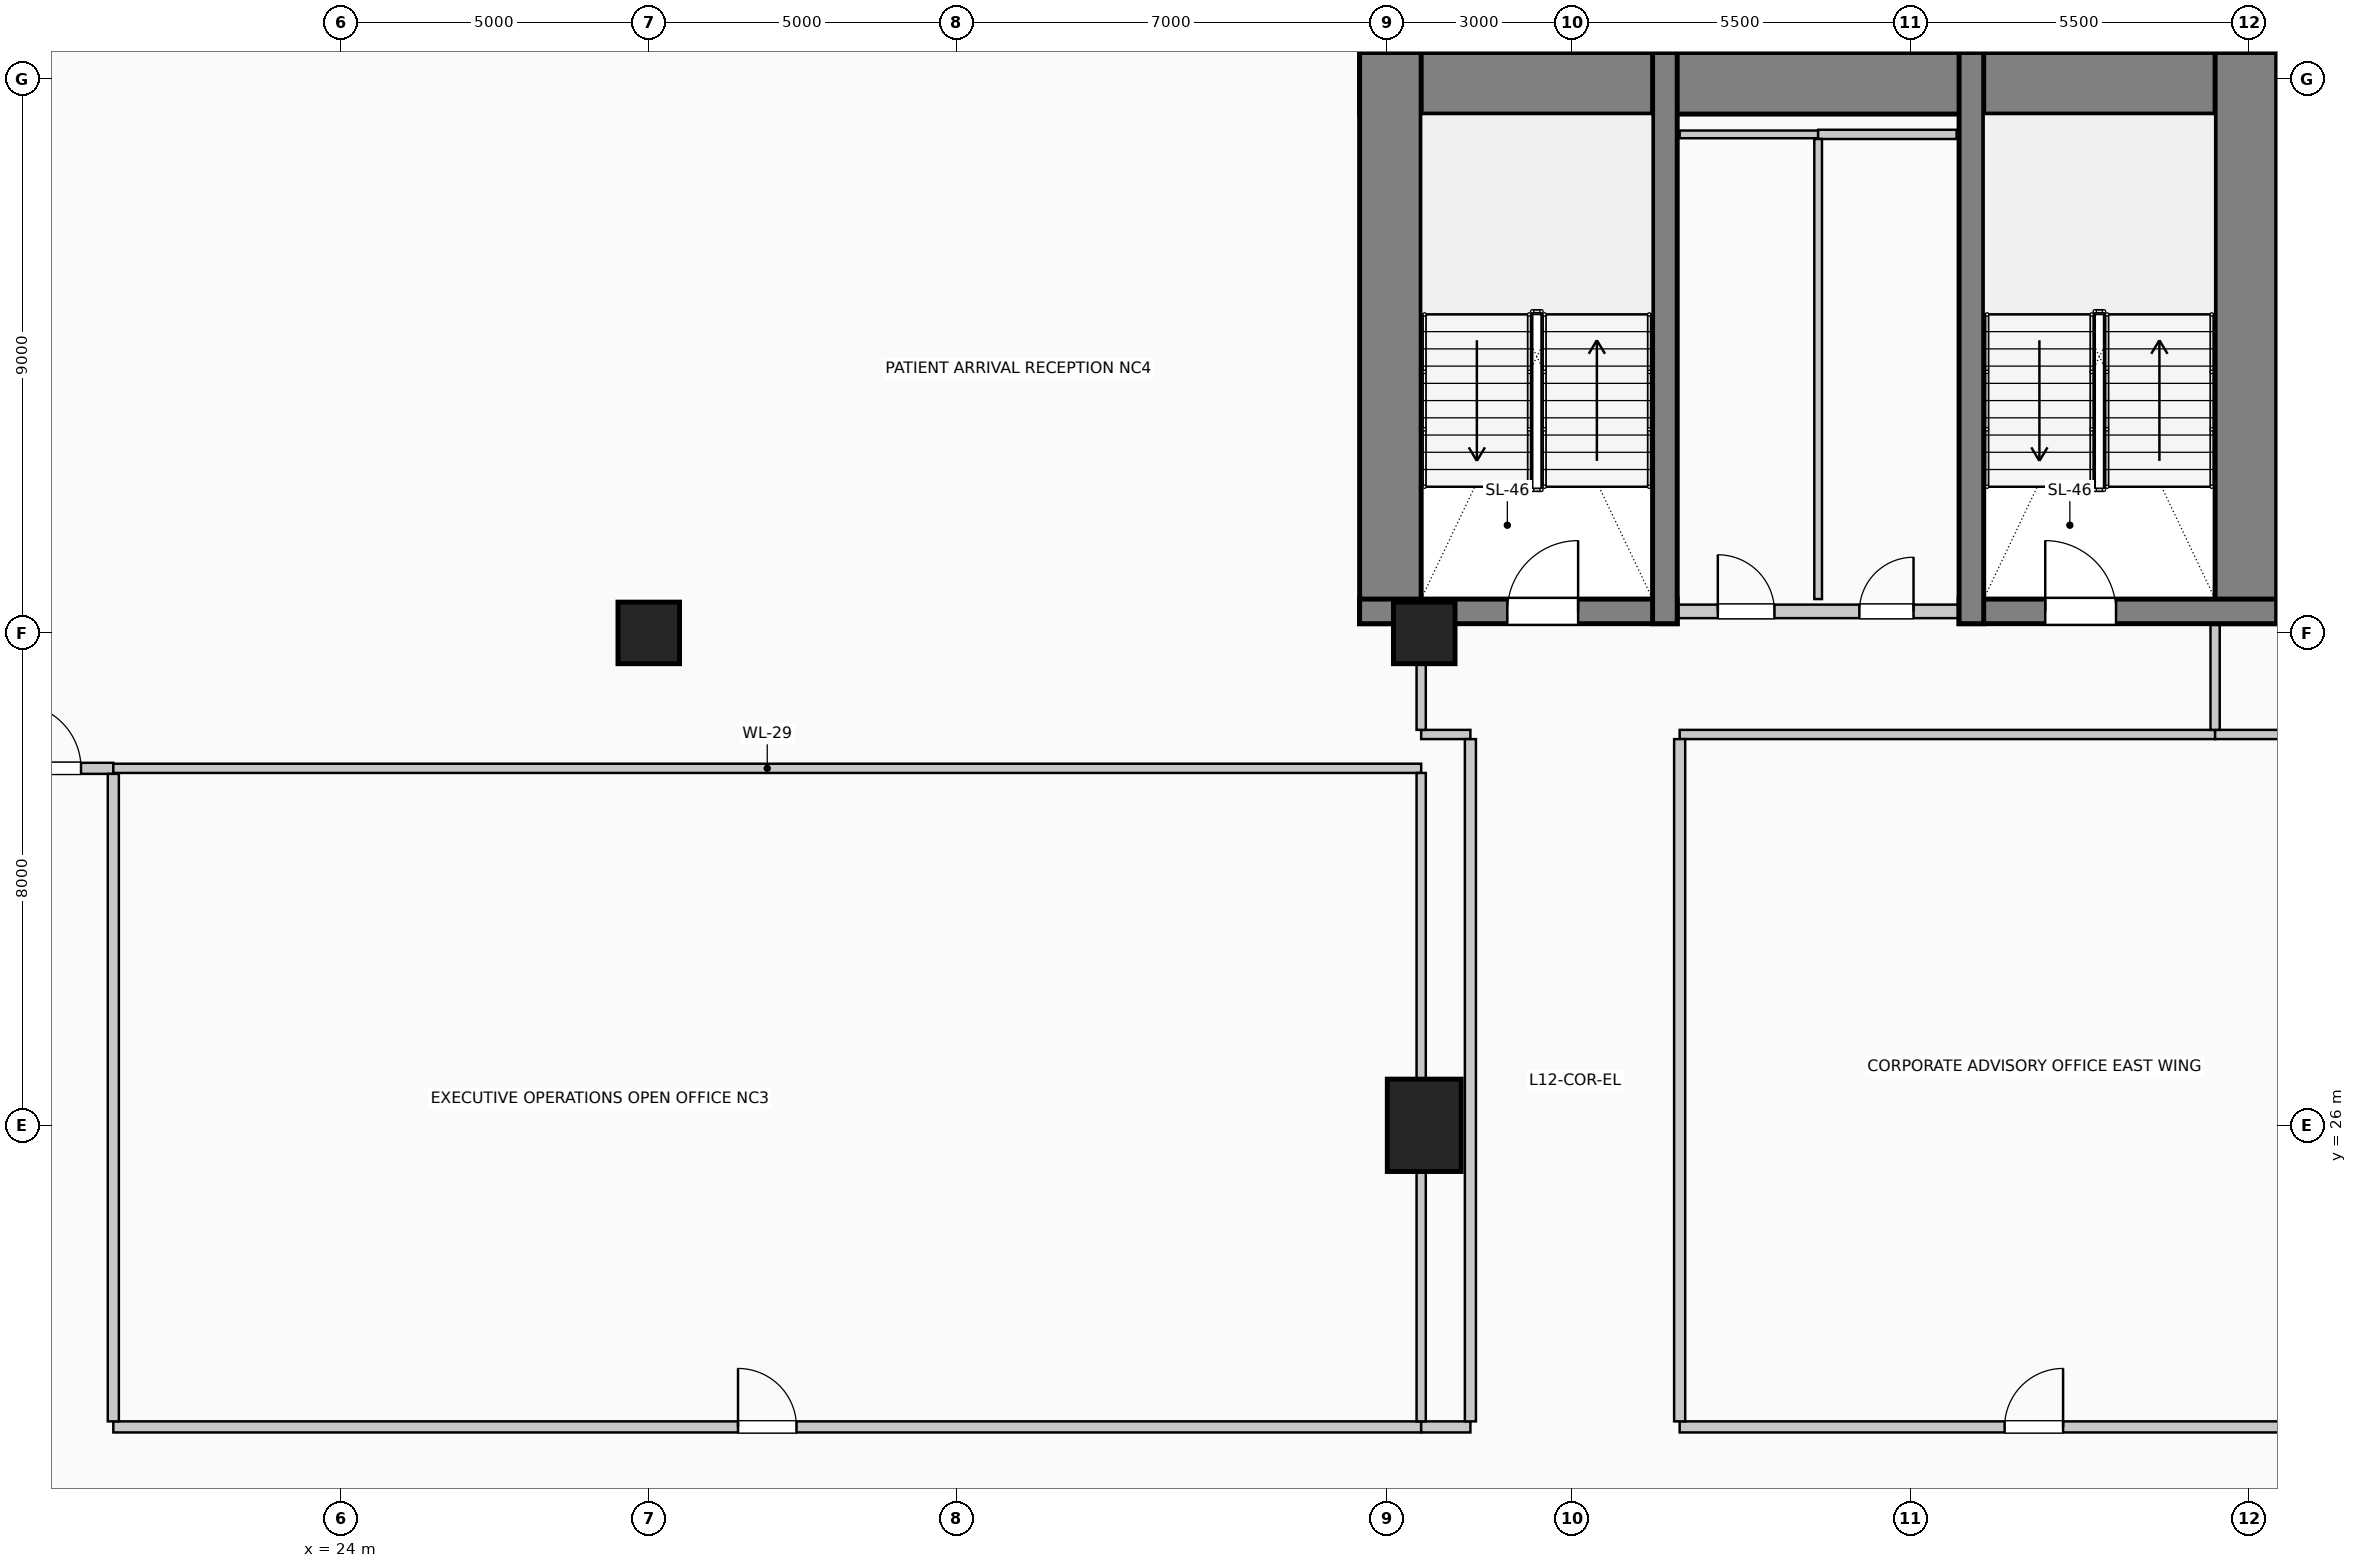
"""IFC4 building model, lengths in metres.
Left out: names, types, materials, properties, quantities, classifications, styles, units other than length and angle.
Written with IfcOpenShell. Run it as: python <this file> out.ifc"""

import sys

from ifc_helpers import new_model, si_unit, direction, frame, frame_2d, origin, origin_2d, place, context, subcontext, project, spatial, rectangle, circle, extrude, element, fill, save


model = new_model("IFC4")
c1 = context("Model", 3, precision=1e-05, world=origin(), true_north=direction((0.0, 1.0)))
c2 = subcontext(c1, "Body", "Model", "MODEL_VIEW")
j1 = project(units=[si_unit("LENGTHUNIT", "METRE"), si_unit("PLANEANGLEUNIT", "RADIAN")], contexts=[c1])
p1 = place(None, origin())
s1 = spatial("IfcSite", under=j1, at=p1, CompositionType="ELEMENT")
p2 = place(p1, origin())
s2 = spatial("IfcBuilding", under=s1, at=p2, CompositionType="ELEMENT")
p3 = place(p2, frame((0.0, 0.0, 50.6)))
s3 = spatial("IfcBuildingStorey", under=s2, at=p3, CompositionType="ELEMENT", Elevation=50.6)
p4 = place(p3, frame((40.55, 42.93, 0.0), z_axis=(0.0, 0.0, 1.0), x_axis=(1.0, 0.0, 0.0)))
e1 = element("IfcWall", 1, at=p4, inside=s3, PredefinedType="SHEAR", context=c2, shape_type="SweptSolid", body=[
    extrude(rectangle(XDim=14.9, YDim=1.0, at=frame_2d((7.45, 0.0))), origin(), (0.0, 0.0, 1.0), 4.0),
])
for number, where, z_axis, x_axis in (
    (2, (41.05, 34.15, 0.0), (0.0, 0.0, 1.0), (0.0, 1.0, 0.0)),
    (3, (54.95, 34.15, 0.0), (0.0, 0.0, 1.0), (0.0, 1.0, 0.0)),
):
    element("IfcWall", number, at=place(p3, frame(where, z_axis=z_axis, x_axis=x_axis)), inside=s3, PredefinedType="SHEAR", context=c2, shape_type="SweptSolid", body=[
        extrude(rectangle(XDim=9.28, YDim=1.0, at=frame_2d((4.64, 0.0))), origin(), (0.0, 0.0, 1.0), 4.0),
    ])
p5 = place(p3, frame((40.55, 34.35, 0.0), z_axis=(0.0, 0.0, 1.0), x_axis=(1.0, 0.0, 0.0)))
e4 = element("IfcWall", 4, at=p5, inside=s3, PredefinedType="SHEAR", context=c2, shape_type="SweptSolid", body=[
    extrude(rectangle(XDim=5.16, YDim=0.4, at=frame_2d((2.58, 0.0))), origin(), (0.0, 0.0, 1.0), 4.0),
])
p6 = place(p5, frame((2.4, 0.0, 0.0)))
e5 = element("IfcOpeningElement", 5, at=p6, cuts=e4, PredefinedType="OPENING", context=c2, shape_type="SweptSolid", body=[
    extrude(rectangle(XDim=1.15, YDim=2.2, at=frame_2d((0.575, 1.1))), frame((0.0, 0.21, 0.0), z_axis=(0.0, -1.0, 0.0), x_axis=(1.0, 0.0, 0.0)), (0.0, 0.0, 1.0), 0.42),
])
p7 = place(p3, frame((45.51, 34.15, 0.0), z_axis=(0.0, 0.0, 1.0), x_axis=(0.0, 1.0, 0.0)))
e6 = element("IfcWall", 6, at=p7, inside=s3, PredefinedType="SHEAR", context=c2, shape_type="SweptSolid", body=[
    extrude(rectangle(XDim=9.28, YDim=0.4, at=frame_2d((4.64, 0.0))), origin(), (0.0, 0.0, 1.0), 4.0),
])
p8 = place(p3, frame((50.29, 34.35, 0.0), z_axis=(0.0, 0.0, 1.0), x_axis=(1.0, 0.0, 0.0)))
e7 = element("IfcWall", 7, at=p8, inside=s3, PredefinedType="SHEAR", context=c2, shape_type="SweptSolid", body=[
    extrude(rectangle(XDim=5.16, YDim=0.4, at=frame_2d((2.58, 0.0))), origin(), (0.0, 0.0, 1.0), 4.0),
])
p9 = place(p8, frame((1.4, 0.0, 0.0)))
e8 = element("IfcOpeningElement", 8, at=p9, cuts=e7, PredefinedType="OPENING", context=c2, shape_type="SweptSolid", body=[
    extrude(rectangle(XDim=1.15, YDim=2.2, at=frame_2d((0.575, 1.1))), frame((0.0, 0.21, 0.0), z_axis=(0.0, -1.0, 0.0), x_axis=(1.0, 0.0, 0.0)), (0.0, 0.0, 1.0), 0.42),
])
p10 = place(p3, frame((50.49, 34.15, 0.0), z_axis=(0.0, 0.0, 1.0), x_axis=(0.0, 1.0, 0.0)))
e9 = element("IfcWall", 9, at=p10, inside=s3, PredefinedType="SHEAR", context=c2, shape_type="SweptSolid", body=[
    extrude(rectangle(XDim=9.28, YDim=0.4, at=frame_2d((4.64, 0.0))), origin(), (0.0, 0.0, 1.0), 4.0),
])
p11 = place(p3, frame((41.6, 26.0, 0.0), z_axis=(0.0, 0.0, 1.0), x_axis=(1.0, 0.0, 0.0)))
e10 = element("IfcColumn", 10, at=p11, inside=s3, PredefinedType="COLUMN", context=c2, shape_type="SweptSolid", body=[
    extrude(rectangle(XDim=1.2, YDim=1.5, at=origin_2d()), origin(), (0.0, 0.0, 1.0), 4.0),
])
for number, where, z_axis, x_axis in (
    (11, (29.0, 34.0, 0.0), (0.0, 0.0, 1.0), (1.0, 0.0, 0.0)),
    (12, (41.6, 34.0, 0.0), (0.0, 0.0, 1.0), (1.0, 0.0, 0.0)),
):
    element("IfcColumn", number, at=place(p3, frame(where, z_axis=z_axis, x_axis=x_axis)), inside=s3, PredefinedType="COLUMN", context=c2, shape_type="SweptSolid", body=[
        extrude(circle(Radius=0.5, at=origin_2d()), origin(), (0.0, 0.0, 1.0), 4.0),
    ])
p12 = place(p3, frame((45.72, 34.35, 0.0), z_axis=(0.0, 0.0, 1.0), x_axis=(1.0, 0.0, 0.0)))
e13 = element("IfcWall", 13, at=p12, inside=s3, PredefinedType="PARTITIONING", context=c2, shape_type="SweptSolid", body=[
    extrude(rectangle(XDim=4.56, YDim=0.22, at=frame_2d((2.28, 0.0))), origin(), (0.0, 0.0, 1.0), 3.7),
])
p13 = place(p12, frame((0.65, 0.0, 0.0)))
e14 = element("IfcOpeningElement", 14, at=p13, cuts=e13, PredefinedType="OPENING", context=c2, shape_type="SweptSolid", body=[
    extrude(rectangle(XDim=0.92, YDim=2.1, at=frame_2d((0.46, 1.05))), frame((0.0, 0.12, 0.0), z_axis=(0.0, -1.0, 0.0), x_axis=(1.0, 0.0, 0.0)), (0.0, 0.0, 1.0), 0.24),
])
p14 = place(p12, frame((2.95, 0.0, 0.0)))
e15 = element("IfcOpeningElement", 15, at=p14, cuts=e13, PredefinedType="OPENING", context=c2, shape_type="SweptSolid", body=[
    extrude(rectangle(XDim=0.88, YDim=2.1, at=frame_2d((0.44, 1.05))), frame((0.0, 0.12, 0.0), z_axis=(0.0, -1.0, 0.0), x_axis=(1.0, 0.0, 0.0)), (0.0, 0.0, 1.0), 0.24),
])
p15 = place(p3, frame((20.3, 21.1, 0.0), z_axis=(0.0, 0.0, 1.0), x_axis=(1.0, 0.0, 0.0)))
e16 = element("IfcWall", 16, at=p15, inside=s3, PredefinedType="PARTITIONING", context=c2, shape_type="SweptSolid", body=[
    extrude(rectangle(XDim=21.25, YDim=0.18, at=frame_2d((10.625, 0.0))), origin(), (0.0, 0.0, 1.0), 3.7),
])
p16 = place(p15, frame((10.15, 0.0, 0.0)))
e17 = element("IfcOpeningElement", 17, at=p16, cuts=e16, PredefinedType="OPENING", context=c2, shape_type="SweptSolid", body=[
    extrude(rectangle(XDim=0.95, YDim=2.15, at=frame_2d((0.475, 1.075))), frame((0.0, 0.1, 0.0), z_axis=(0.0, -1.0, 0.0), x_axis=(1.0, 0.0, 0.0)), (0.0, 0.0, 1.0), 0.2),
])
p17 = place(p3, frame((41.55, 21.1, 0.0), z_axis=(0.0, 0.0, 1.0), x_axis=(1.0, 0.0, 0.0)))
e18 = element("IfcWall", 18, at=p17, inside=s3, PredefinedType="PARTITIONING", context=c2, shape_type="SweptSolid", body=[
    extrude(rectangle(XDim=0.8, YDim=0.18, at=frame_2d((0.4, 0.0))), origin(), (0.0, 0.0, 1.0), 3.7),
])
p18 = place(p3, frame((45.75, 21.1, 0.0), z_axis=(0.0, 0.0, 1.0), x_axis=(1.0, 0.0, 0.0)))
e19 = element("IfcWall", 19, at=p18, inside=s3, PredefinedType="PARTITIONING", context=c2, shape_type="SweptSolid", body=[
    extrude(rectangle(XDim=11.51, YDim=0.18, at=frame_2d((5.755, 0.0))), origin(), (0.0, 0.0, 1.0), 3.7),
])
p19 = place(p18, frame((5.28, 0.0, 0.0)))
e20 = element("IfcOpeningElement", 20, at=p19, cuts=e19, PredefinedType="OPENING", context=c2, shape_type="SweptSolid", body=[
    extrude(rectangle(XDim=0.95, YDim=2.15, at=frame_2d((0.475, 1.075))), frame((0.0, 0.1, 0.0), z_axis=(0.0, -1.0, 0.0), x_axis=(1.0, 0.0, 0.0)), (0.0, 0.0, 1.0), 0.2),
])
p20 = place(p3, frame((18.2, 31.8, 0.0), z_axis=(0.0, 0.0, 1.0), x_axis=(1.0, 0.0, 0.0)))
e21 = element("IfcWall", 21, at=p20, inside=s3, PredefinedType="PARTITIONING", context=c2, shape_type="SweptSolid", body=[
    extrude(rectangle(XDim=2.1, YDim=0.18, at=frame_2d((1.05, 0.0))), origin(), (0.0, 0.0, 1.0), 3.7),
])
p21 = place(p20, frame((0.525, 0.0, 0.0)))
e22 = element("IfcOpeningElement", 22, at=p21, cuts=e21, PredefinedType="OPENING", context=c2, shape_type="SweptSolid", body=[
    extrude(rectangle(XDim=1.05, YDim=2.15, at=frame_2d((0.525, 1.075))), frame((0.0, 0.1, 0.0), z_axis=(0.0, -1.0, 0.0), x_axis=(1.0, 0.0, 0.0)), (0.0, 0.0, 1.0), 0.2),
])
p22 = place(p3, frame((20.3, 31.8, 0.0), z_axis=(0.0, 0.0, 1.0), x_axis=(1.0, 0.0, 0.0)))
e23 = element("IfcWall", 23, at=p22, inside=s3, PredefinedType="PARTITIONING", context=c2, shape_type="SweptSolid", body=[
    extrude(rectangle(XDim=21.25, YDim=0.15, at=frame_2d((10.625, 0.0))), origin(), (0.0, 0.0, 1.0), 3.7),
])
p23 = place(p3, frame((41.55, 32.35, 0.0), z_axis=(0.0, 0.0, 1.0), x_axis=(1.0, 0.0, 0.0)))
e24 = element("IfcWall", 24, at=p23, inside=s3, PredefinedType="PARTITIONING", context=c2, shape_type="SweptSolid", body=[
    extrude(rectangle(XDim=0.8, YDim=0.15, at=frame_2d((0.4, 0.0))), origin(), (0.0, 0.0, 1.0), 3.7),
])
p24 = place(p3, frame((45.75, 32.35, 0.0), z_axis=(0.0, 0.0, 1.0), x_axis=(1.0, 0.0, 0.0)))
e25 = element("IfcWall", 25, at=p24, inside=s3, PredefinedType="PARTITIONING", context=c2, shape_type="SweptSolid", body=[
    extrude(rectangle(XDim=8.7, YDim=0.15, at=frame_2d((4.35, 0.0))), origin(), (0.0, 0.0, 1.0), 3.7),
])
p25 = place(p3, frame((54.45, 32.35, 0.0), z_axis=(0.0, 0.0, 1.0), x_axis=(1.0, 0.0, 0.0)))
e26 = element("IfcWall", 26, at=p25, inside=s3, PredefinedType="PARTITIONING", context=c2, shape_type="SweptSolid", body=[
    extrude(rectangle(XDim=2.81, YDim=0.15, at=frame_2d((1.405, 0.0))), origin(), (0.0, 0.0, 1.0), 3.7),
])
p26 = place(p3, frame((45.75, 42.1, 0.0), z_axis=(0.0, 0.0, 1.0), x_axis=(1.0, 0.0, 0.0)))
e27 = element("IfcWall", 27, at=p26, inside=s3, PredefinedType="PARTITIONING", context=c2, shape_type="SweptSolid", body=[
    extrude(rectangle(XDim=2.25, YDim=0.125, at=frame_2d((1.125, 0.0))), origin(), (0.0, 0.0, 1.0), 3.7),
])
p27 = place(p3, frame((48.0, 42.1, 0.0), z_axis=(0.0, 0.0, 1.0), x_axis=(1.0, 0.0, 0.0)))
e28 = element("IfcWall", 28, at=p27, inside=s3, PredefinedType="PARTITIONING", context=c2, shape_type="SweptSolid", body=[
    extrude(rectangle(XDim=2.25, YDim=0.15, at=frame_2d((1.125, 0.0))), origin(), (0.0, 0.0, 1.0), 3.7),
])
p28 = place(p3, frame((20.3, 21.19, 0.0), z_axis=(0.0, 0.0, 1.0), x_axis=(0.0, 1.0, 0.0)))
e29 = element("IfcWall", 29, at=p28, inside=s3, PredefinedType="PARTITIONING", context=c2, shape_type="SweptSolid", body=[
    extrude(rectangle(XDim=10.52, YDim=0.18, at=frame_2d((5.26, 0.0))), origin(), (0.0, 0.0, 1.0), 3.7),
])
p29 = place(p3, frame((41.55, 21.19, 0.0), z_axis=(0.0, 0.0, 1.0), x_axis=(0.0, 1.0, 0.0)))
e30 = element("IfcWall", 30, at=p29, inside=s3, PredefinedType="PARTITIONING", context=c2, shape_type="SweptSolid", body=[
    extrude(rectangle(XDim=4.06, YDim=0.15, at=frame_2d((2.03, 0.0))), origin(), (0.0, 0.0, 1.0), 2.995),
])
p30 = place(p3, frame((41.55, 26.75, 0.0), z_axis=(0.0, 0.0, 1.0), x_axis=(0.0, 1.0, 0.0)))
e31 = element("IfcWall", 31, at=p30, inside=s3, PredefinedType="PARTITIONING", context=c2, shape_type="SweptSolid", body=[
    extrude(rectangle(XDim=4.975, YDim=0.15, at=frame_2d((2.488, 0.0))), origin(), (0.0, 0.0, 1.0), 2.995),
])
p31 = place(p3, frame((41.55, 32.425, 0.0), z_axis=(0.0, 0.0, 1.0), x_axis=(0.0, 1.0, 0.0)))
e32 = element("IfcWall", 32, at=p31, inside=s3, PredefinedType="PARTITIONING", context=c2, shape_type="SweptSolid", body=[
    extrude(rectangle(XDim=1.075, YDim=0.15, at=frame_2d((0.538, 0.0))), origin(), (0.0, 0.0, 1.0), 2.995),
])
p32 = place(p3, frame((41.55, 43.43, 0.0), z_axis=(0.0, 0.0, 1.0), x_axis=(0.0, 1.0, 0.0)))
e33 = element("IfcWall", 33, at=p32, inside=s3, PredefinedType="PARTITIONING", context=c2, shape_type="SweptSolid", body=[
    extrude(rectangle(XDim=1.22, YDim=0.15, at=frame_2d((0.61, 0.0))), origin(), (0.0, 0.0, 1.0), 3.7),
])
for number, where, z_axis, x_axis in (
    (34, (42.35, 21.19, 0.0), (0.0, 0.0, 1.0), (0.0, 1.0, 0.0)),
    (35, (45.75, 21.19, 0.0), (0.0, 0.0, 1.0), (0.0, 1.0, 0.0)),
):
    element("IfcWall", number, at=place(p3, frame(where, z_axis=z_axis, x_axis=x_axis)), inside=s3, PredefinedType="PARTITIONING", context=c2, shape_type="SweptSolid", body=[
        extrude(rectangle(XDim=11.085, YDim=0.18, at=frame_2d((5.542, 0.0))), origin(), (0.0, 0.0, 1.0), 3.7),
    ])
p33 = place(p3, frame((48.0, 34.55, 0.0), z_axis=(0.0, 0.0, 1.0), x_axis=(0.0, 1.0, 0.0)))
e36 = element("IfcWall", 36, at=p33, inside=s3, PredefinedType="PARTITIONING", context=c2, shape_type="SweptSolid", body=[
    extrude(rectangle(XDim=7.475, YDim=0.125, at=frame_2d((3.737, 0.0))), origin(), (0.0, 0.0, 1.0), 3.7),
])
p34 = place(p3, frame((54.45, 32.425, 0.0), z_axis=(0.0, 0.0, 1.0), x_axis=(0.0, 1.0, 0.0)))
e37 = element("IfcWall", 37, at=p34, inside=s3, PredefinedType="PARTITIONING", context=c2, shape_type="SweptSolid", body=[
    extrude(rectangle(XDim=1.725, YDim=0.15, at=frame_2d((0.862, 0.0))), origin(), (0.0, 0.0, 1.0), 3.7),
])
p35 = place(p6, origin())
e38 = element("IfcDoor", 38, at=p35, inside=s3, OperationType="SINGLE_SWING_RIGHT", PredefinedType="DOOR", context=c2, shape_type="SweptSolid", body=[
    extrude(rectangle(XDim=1.15, YDim=2.2, at=frame_2d((0.575, 1.1))), frame((0.0, 0.025, 0.0), z_axis=(0.0, -1.0, 0.0), x_axis=(1.0, 0.0, 0.0)), (0.0, 0.0, 1.0), 0.05),
])
fill(e5, e38)
p36 = place(p13, origin())
e39 = element("IfcDoor", 39, at=p36, inside=s3, OperationType="SINGLE_SWING_LEFT", PredefinedType="DOOR", context=c2, shape_type="SweptSolid", body=[
    extrude(rectangle(XDim=0.92, YDim=2.1, at=frame_2d((0.46, 1.05))), frame((0.0, 0.025, 0.0), z_axis=(0.0, -1.0, 0.0), x_axis=(1.0, 0.0, 0.0)), (0.0, 0.0, 1.0), 0.05),
])
fill(e14, e39)
p37 = place(p14, origin())
e40 = element("IfcDoor", 40, at=p37, inside=s3, OperationType="SINGLE_SWING_RIGHT", PredefinedType="DOOR", context=c2, shape_type="SweptSolid", body=[
    extrude(rectangle(XDim=0.88, YDim=2.1, at=frame_2d((0.44, 1.05))), frame((0.0, 0.025, 0.0), z_axis=(0.0, -1.0, 0.0), x_axis=(1.0, 0.0, 0.0)), (0.0, 0.0, 1.0), 0.05),
])
fill(e15, e40)
p38 = place(p9, origin())
e41 = element("IfcDoor", 41, at=p38, inside=s3, OperationType="SINGLE_SWING_LEFT", PredefinedType="DOOR", context=c2, shape_type="SweptSolid", body=[
    extrude(rectangle(XDim=1.15, YDim=2.2, at=frame_2d((0.575, 1.1))), frame((0.0, 0.025, 0.0), z_axis=(0.0, -1.0, 0.0), x_axis=(1.0, 0.0, 0.0)), (0.0, 0.0, 1.0), 0.05),
])
fill(e8, e41)
p39 = place(p16, origin())
e42 = element("IfcDoor", 42, at=p39, inside=s3, OperationType="SINGLE_SWING_LEFT", PredefinedType="DOOR", context=c2, shape_type="SweptSolid", body=[
    extrude(rectangle(XDim=0.95, YDim=2.15, at=frame_2d((0.475, 1.075))), frame((0.0, 0.025, 0.0), z_axis=(0.0, -1.0, 0.0), x_axis=(1.0, 0.0, 0.0)), (0.0, 0.0, 1.0), 0.05),
])
fill(e17, e42)
p40 = place(p19, origin())
e43 = element("IfcDoor", 43, at=p40, inside=s3, OperationType="SINGLE_SWING_RIGHT", PredefinedType="DOOR", context=c2, shape_type="SweptSolid", body=[
    extrude(rectangle(XDim=0.95, YDim=2.15, at=frame_2d((0.475, 1.075))), frame((0.0, 0.025, 0.0), z_axis=(0.0, -1.0, 0.0), x_axis=(1.0, 0.0, 0.0)), (0.0, 0.0, 1.0), 0.05),
])
fill(e20, e43)
p41 = place(p21, origin())
e44 = element("IfcDoor", 44, at=p41, inside=s3, OperationType="SINGLE_SWING_LEFT", PredefinedType="DOOR", context=c2, shape_type="SweptSolid", body=[
    extrude(rectangle(XDim=1.05, YDim=2.15, at=frame_2d((0.525, 1.075))), frame((0.0, 0.025, 0.0), z_axis=(0.0, -1.0, 0.0), x_axis=(1.0, 0.0, 0.0)), (0.0, 0.0, 1.0), 0.05),
])
fill(e22, e44)
save(model, sys.argv[1])
